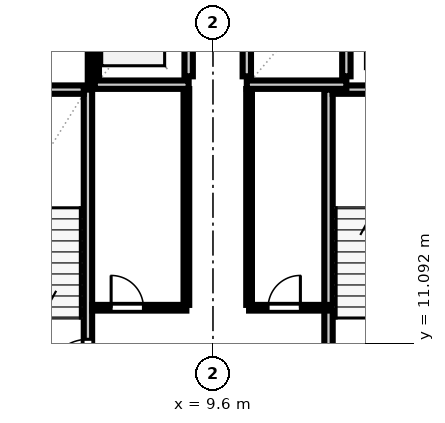
"""IFC4 building model, lengths in metres.
Left out: names, types, materials, properties, quantities, classifications, styles, units other than length and angle.
Written with IfcOpenShell. Run it as: python <this file> out.ifc"""

import sys

from ifc_helpers import new_model, si_unit, direction, frame, frame_2d, origin, place, context, subcontext, project, spatial, rectangle, extrude, element, fill, save


model = new_model("IFC4")
c1 = context("Model", 3, precision=1e-05, world=origin(), true_north=direction((0.0, 1.0)))
c2 = subcontext(c1, "Body", "Model", "MODEL_VIEW")
j1 = project(units=[si_unit("LENGTHUNIT", "METRE"), si_unit("PLANEANGLEUNIT", "RADIAN")], contexts=[c1])
p1 = place(None, origin())
s1 = spatial("IfcSite", under=j1, at=p1, CompositionType="ELEMENT")
p2 = place(p1, origin())
s2 = spatial("IfcBuilding", under=s1, at=p2, CompositionType="ELEMENT")
p3 = place(p2, frame((0.0, 0.0, 58.4)))
s3 = spatial("IfcBuildingStorey", under=s2, at=p3, CompositionType="ELEMENT", Elevation=58.4)
p4 = place(p3, frame((6.31, 9.95, 0.0), z_axis=(0.0, 0.0, 1.0), x_axis=(0.0, 1.0, 0.0)))
e1 = element("IfcWall", 1, at=p4, inside=s3, PredefinedType="SOLIDWALL", context=c2, shape_type="SweptSolid", body=[
    extrude(rectangle(XDim=7.81, YDim=0.22, at=frame_2d((3.905, 0.0))), origin(), (0.0, 0.0, 1.0), 3.54),
])
p5 = place(p4, frame((0.14, 0.0, 0.0)))
e2 = element("IfcOpeningElement", 2, at=p5, cuts=e1, PredefinedType="OPENING", context=c2, shape_type="SweptSolid", body=[
    extrude(rectangle(XDim=1.1, YDim=2.2, at=frame_2d((0.55, 1.1))), frame((0.0, 0.122, 0.0), z_axis=(0.0, -1.0, 0.0), x_axis=(1.0, 0.0, 0.0)), (0.0, 0.0, 1.0), 0.244),
])
p6 = place(p3, frame((2.65, 17.76, 0.0), z_axis=(0.0, 0.0, 1.0), x_axis=(1.0, 0.0, 0.0)))
e3 = element("IfcWall", 3, at=p6, inside=s3, PredefinedType="SOLIDWALL", context=c2, shape_type="SweptSolid", body=[
    extrude(rectangle(XDim=3.55, YDim=0.22, at=frame_2d((1.775, 0.0))), origin(), (0.0, 0.0, 1.0), 3.54),
])
p7 = place(p3, frame((12.64, 10.05, 0.0), z_axis=(0.0, 0.0, 1.0), x_axis=(0.0, 1.0, 0.0)))
e4 = element("IfcWall", 4, at=p7, inside=s3, PredefinedType="SOLIDWALL", context=c2, shape_type="SweptSolid", body=[
    extrude(rectangle(XDim=7.71, YDim=0.22, at=frame_2d((3.855, 0.0))), origin(), (0.0, 0.0, 1.0), 3.54),
])
p8 = place(p3, frame((12.75, 17.76, 0.0), z_axis=(0.0, 0.0, 1.0), x_axis=(1.0, 0.0, 0.0)))
e5 = element("IfcWall", 5, at=p8, inside=s3, PredefinedType="SOLIDWALL", context=c2, shape_type="SweptSolid", body=[
    extrude(rectangle(XDim=3.6, YDim=0.22, at=frame_2d((1.8, 0.0))), origin(), (0.0, 0.0, 1.0), 3.54),
])
p9 = place(p3, frame((6.49, 18.11, 0.0), z_axis=(0.0, 0.0, 1.0), x_axis=(0.0, 1.0, 0.0)))
e6 = element("IfcWall", 6, at=p9, inside=s3, PredefinedType="SOLIDWALL", context=c2, shape_type="SweptSolid", body=[
    extrude(rectangle(XDim=2.58, YDim=0.22, at=frame_2d((1.29, 0.0))), origin(), (0.0, 0.0, 1.0), 3.54),
])
p10 = place(p3, frame((8.96, 18.11, 0.0), z_axis=(0.0, 0.0, 1.0), x_axis=(0.0, 1.0, 0.0)))
e7 = element("IfcWall", 7, at=p10, inside=s3, PredefinedType="SOLIDWALL", context=c2, shape_type="SweptSolid", body=[
    extrude(rectangle(XDim=2.58, YDim=0.22, at=frame_2d((1.29, 0.0))), origin(), (0.0, 0.0, 1.0), 3.54),
])
p11 = place(p10, frame((0.74, 0.0, 0.0)))
e8 = element("IfcOpeningElement", 8, at=p11, cuts=e7, PredefinedType="OPENING", context=c2, shape_type="SweptSolid", body=[
    extrude(rectangle(XDim=1.1, YDim=2.2, at=frame_2d((0.55, 1.1))), frame((0.0, 0.122, 0.0), z_axis=(0.0, -1.0, 0.0), x_axis=(1.0, 0.0, 0.0)), (0.0, 0.0, 1.0), 0.244),
])
p12 = place(p3, frame((6.49, 17.89, 0.0), z_axis=(0.0, 0.0, 1.0), x_axis=(1.0, 0.0, 0.0)))
e9 = element("IfcWall", 9, at=p12, inside=s3, PredefinedType="SOLIDWALL", context=c2, shape_type="SweptSolid", body=[
    extrude(rectangle(XDim=2.47, YDim=0.22, at=frame_2d((1.235, 0.0))), origin(), (0.0, 0.0, 1.0), 3.54),
])
for number, where, z_axis, x_axis in (
    (10, (10.49, 18.11, 0.0), (0.0, 0.0, 1.0), (0.0, 1.0, 0.0)),
    (11, (13.11, 18.11, 0.0), (0.0, 0.0, 1.0), (0.0, 1.0, 0.0)),
):
    element("IfcWall", number, at=place(p3, frame(where, z_axis=z_axis, x_axis=x_axis)), inside=s3, PredefinedType="SOLIDWALL", context=c2, shape_type="SweptSolid", body=[
        extrude(rectangle(XDim=2.58, YDim=0.22, at=frame_2d((1.29, 0.0))), origin(), (0.0, 0.0, 1.0), 3.54),
    ])
p13 = place(p3, frame((10.49, 17.89, 0.0), z_axis=(0.0, 0.0, 1.0), x_axis=(1.0, 0.0, 0.0)))
e12 = element("IfcWall", 12, at=p13, inside=s3, PredefinedType="SOLIDWALL", context=c2, shape_type="SweptSolid", body=[
    extrude(rectangle(XDim=2.62, YDim=0.22, at=frame_2d((1.31, 0.0))), origin(), (0.0, 0.0, 1.0), 3.54),
])
p14 = place(p3, frame((6.42, 12.02, 0.0), z_axis=(0.0, 0.0, 1.0), x_axis=(1.0, 0.0, 0.0)))
e13 = element("IfcWall", 13, at=p14, inside=s3, PredefinedType="PARTITIONING", context=c2, shape_type="SweptSolid", body=[
    extrude(rectangle(XDim=2.48, YDim=0.15, at=frame_2d((1.24, 0.0))), origin(), (0.0, 0.0, 1.0), 3.54),
])
p15 = place(p14, frame((0.5, 0.0, 0.0)))
e14 = element("IfcOpeningElement", 14, at=p15, cuts=e13, PredefinedType="OPENING", context=c2, shape_type="SweptSolid", body=[
    extrude(rectangle(XDim=0.85, YDim=2.1, at=frame_2d((0.425, 1.05))), frame((0.0, 0.087, 0.0), z_axis=(0.0, -1.0, 0.0), x_axis=(1.0, 0.0, 0.0)), (0.0, 0.0, 1.0), 0.174),
])
p16 = place(p3, frame((10.55, 12.02, 0.0), z_axis=(0.0, 0.0, 1.0), x_axis=(1.0, 0.0, 0.0)))
e15 = element("IfcWall", 15, at=p16, inside=s3, PredefinedType="PARTITIONING", context=c2, shape_type="SweptSolid", body=[
    extrude(rectangle(XDim=2.08, YDim=0.15, at=frame_2d((1.04, 0.0))), origin(), (0.0, 0.0, 1.0), 3.54),
])
p17 = place(p16, frame((0.5, 0.0, 0.0)))
e16 = element("IfcOpeningElement", 16, at=p17, cuts=e15, PredefinedType="OPENING", context=c2, shape_type="SweptSolid", body=[
    extrude(rectangle(XDim=0.85, YDim=2.1, at=frame_2d((0.425, 1.05))), frame((0.0, 0.087, 0.0), z_axis=(0.0, -1.0, 0.0), x_axis=(1.0, 0.0, 0.0)), (0.0, 0.0, 1.0), 0.174),
])
for number, where, z_axis, x_axis in (
    (17, (8.9, 12.095, 0.0), (0.0, 0.0, 1.0), (0.0, 1.0, 0.0)),
    (18, (10.55, 12.095, 0.0), (0.0, 0.0, 1.0), (0.0, 1.0, 0.0)),
):
    element("IfcWall", number, at=place(p3, frame(where, z_axis=z_axis, x_axis=x_axis)), inside=s3, PredefinedType="PARTITIONING", context=c2, shape_type="SweptSolid", body=[
        extrude(rectangle(XDim=5.68, YDim=0.15, at=frame_2d((2.84, 0.0))), origin(), (0.0, 0.0, 1.0), 3.54),
    ])
p18 = place(p3, frame((6.38, 17.8, 0.0), z_axis=(0.0, 0.0, 1.0), x_axis=(0.0, 1.0, 0.0)))
e19 = element("IfcWall", 19, at=p18, inside=s3, PredefinedType="PARTITIONING", context=c2, shape_type="SweptSolid", body=[
    extrude(rectangle(XDim=18.98, YDim=0.15, at=frame_2d((9.49, 0.0))), origin(), (0.0, 0.0, 1.0), 3.54),
])
p19 = place(p18, frame((14.3, 0.0, 0.0)))
e20 = element("IfcOpeningElement", 20, at=p19, cuts=e19, PredefinedType="OPENING", context=c2, shape_type="SweptSolid", body=[
    extrude(rectangle(XDim=0.85, YDim=2.1, at=frame_2d((0.425, 1.05))), frame((0.0, 0.087, 0.0), z_axis=(0.0, -1.0, 0.0), x_axis=(1.0, 0.0, 0.0)), (0.0, 0.0, 1.0), 0.174),
])
p20 = place(p5, origin())
e21 = element("IfcDoor", 21, at=p20, inside=s3, OperationType="SINGLE_SWING_LEFT", PredefinedType="DOOR", context=c2, shape_type="SweptSolid", body=[
    extrude(rectangle(XDim=1.1, YDim=2.2, at=frame_2d((0.55, 1.1))), frame((0.0, 0.025, 0.0), z_axis=(0.0, -1.0, 0.0), x_axis=(1.0, 0.0, 0.0)), (0.0, 0.0, 1.0), 0.05),
])
fill(e2, e21)
p21 = place(p15, origin())
e22 = element("IfcDoor", 22, at=p21, inside=s3, OperationType="SINGLE_SWING_LEFT", PredefinedType="DOOR", context=c2, shape_type="SweptSolid", body=[
    extrude(rectangle(XDim=0.85, YDim=2.1, at=frame_2d((0.425, 1.05))), frame((0.0, 0.025, 0.0), z_axis=(0.0, -1.0, 0.0), x_axis=(1.0, 0.0, 0.0)), (0.0, 0.0, 1.0), 0.05),
])
fill(e14, e22)
p22 = place(p17, origin())
e23 = element("IfcDoor", 23, at=p22, inside=s3, OperationType="SINGLE_SWING_RIGHT", PredefinedType="DOOR", context=c2, shape_type="SweptSolid", body=[
    extrude(rectangle(XDim=0.85, YDim=2.1, at=frame_2d((0.425, 1.05))), frame((0.0, 0.025, 0.0), z_axis=(0.0, -1.0, 0.0), x_axis=(1.0, 0.0, 0.0)), (0.0, 0.0, 1.0), 0.05),
])
fill(e16, e23)
save(model, sys.argv[1])
